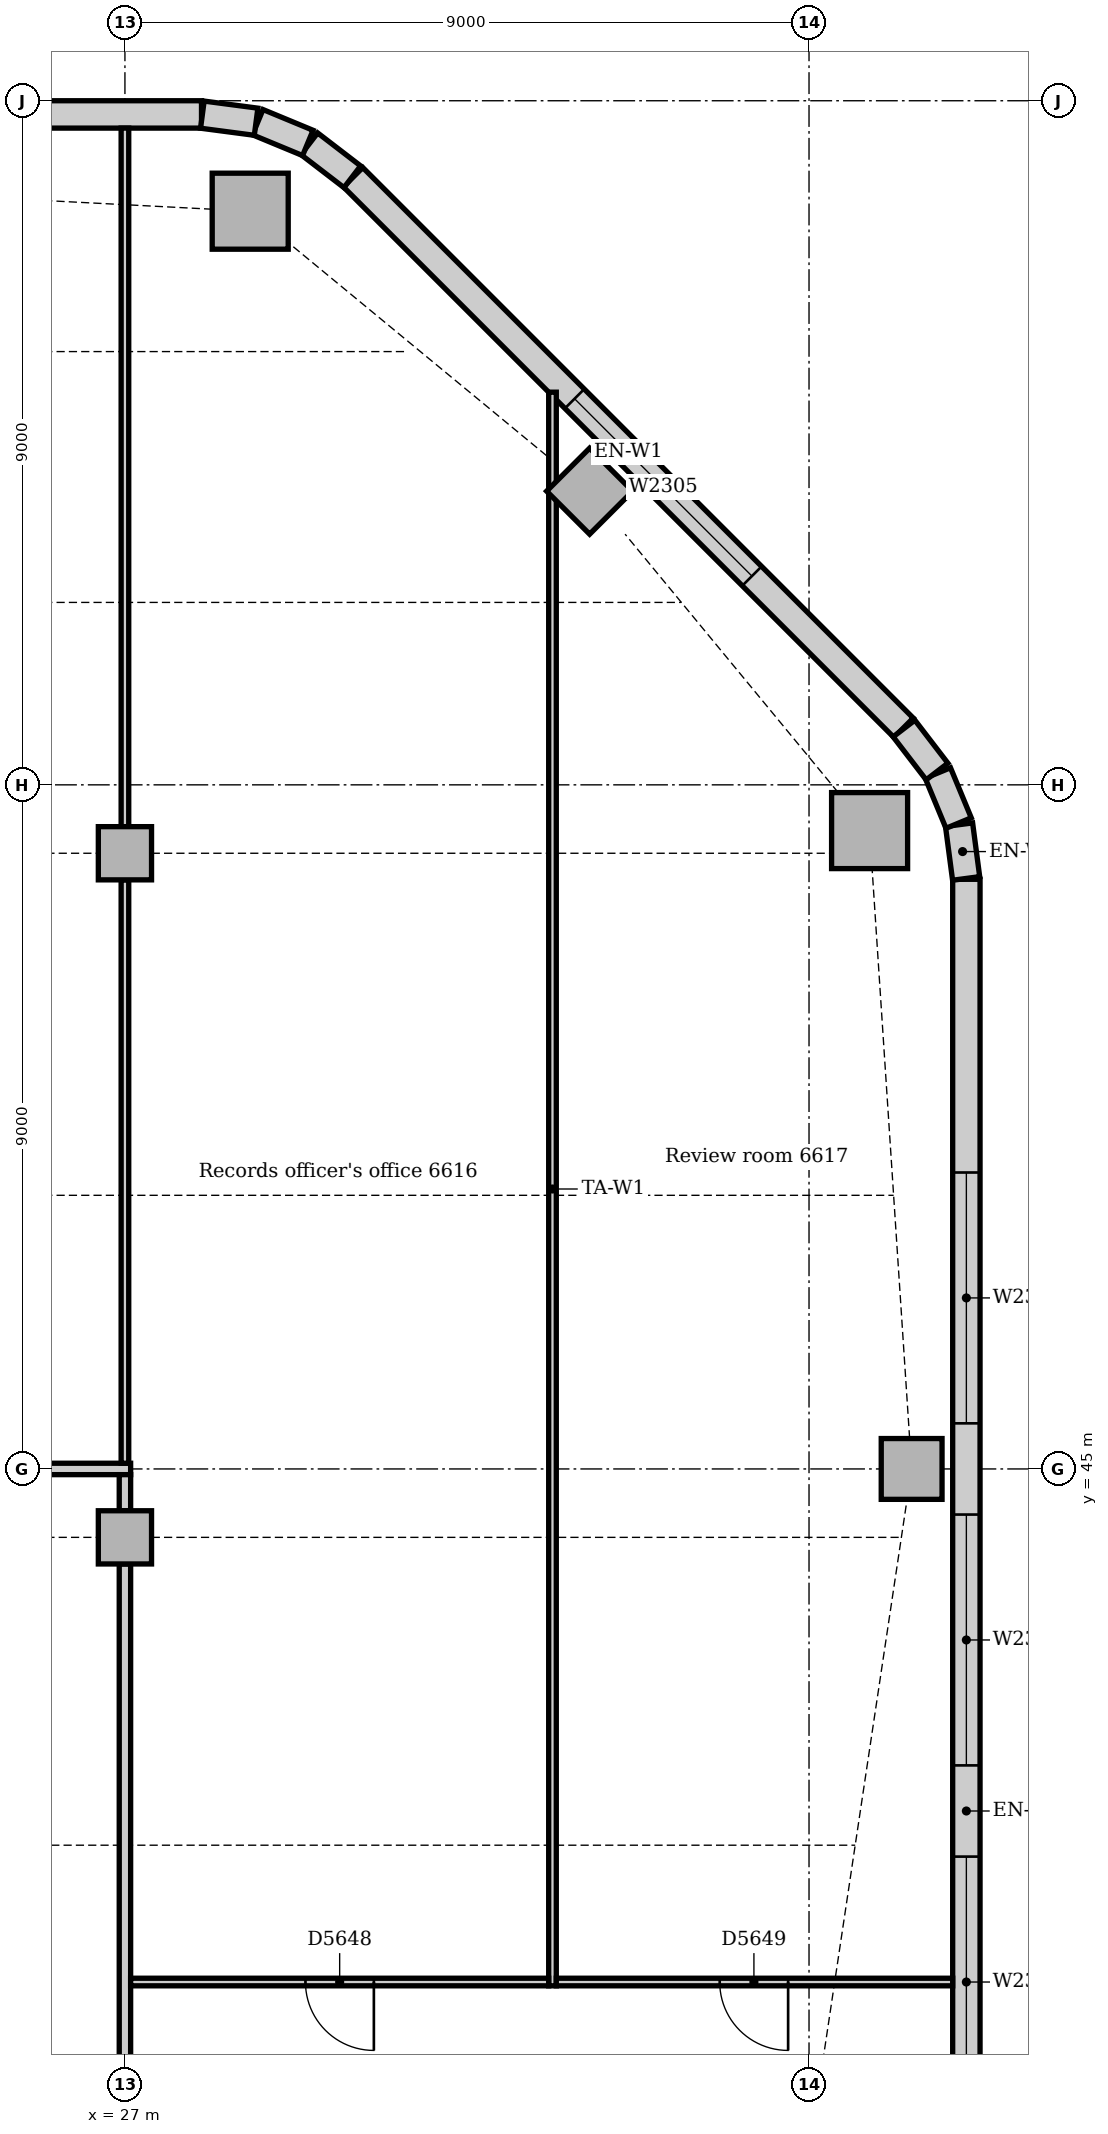
"""IFC4 building model, lengths in metres.
Left out: names, types, materials, properties, quantities, classifications, styles, units other than length and angle.
Written with IfcOpenShell. Run it as: python <this file> out.ifc"""

import sys

from ifc_helpers import new_model, si_unit, direction, frame, frame_2d, origin, origin_2d, place, context, subcontext, project, spatial, rectangle, extrude, element, fill, save


model = new_model("IFC4")
c1 = context("Model", 3, precision=1e-05, world=origin(), true_north=direction((0.0, 1.0)))
c2 = subcontext(c1, "Body", "Model", "MODEL_VIEW")
j1 = project(units=[si_unit("LENGTHUNIT", "METRE"), si_unit("PLANEANGLEUNIT", "RADIAN")], contexts=[c1])
p1 = place(None, origin())
s1 = spatial("IfcSite", under=j1, at=p1, CompositionType="ELEMENT")
p2 = place(p1, origin())
s2 = spatial("IfcBuilding", under=s1, at=p2, CompositionType="ELEMENT")
p3 = place(p2, frame((0.0, 0.0, 275.0)))
s3 = spatial("IfcBuildingStorey", under=s2, at=p3, CompositionType="ELEMENT", Elevation=275.0)
for number, where, z_axis, x_axis in (
    (1, (36.797, 53.398, 0.0), (0.0, 0.0, 1.0), (1.0, 0.0, 0.0)),
    (2, (28.648, 61.547, 0.0), (0.0, 0.0, 1.0), (1.0, 0.0, 0.0)),
):
    element("IfcColumn", number, at=place(p3, frame(where, z_axis=z_axis, x_axis=x_axis)), inside=s3, PredefinedType="COLUMN", context=c2, shape_type="SweptSolid", body=[
        extrude(rectangle(XDim=1.0, YDim=1.0, at=origin_2d()), origin(), (0.0, 0.0, 1.0), 3.85),
    ])
for number, where, z_axis, x_axis in (
    (3, (37.35, 45.0, 0.0), (0.0, 0.0, 1.0), (1.0, 0.0, 0.0)),
    (4, (33.114, 57.864, 0.0), (0.0, 0.0, 1.0), (0.707, 0.707, 0.0)),
):
    element("IfcColumn", number, at=place(p3, frame(where, z_axis=z_axis, x_axis=x_axis)), inside=s3, PredefinedType="COLUMN", context=c2, shape_type="SweptSolid", body=[
        extrude(rectangle(XDim=0.8, YDim=0.8, at=origin_2d()), origin(), (0.0, 0.0, 1.0), 3.85),
    ])
for number, where, z_axis, x_axis in (
    (5, (27.0, 44.1, 0.0), (0.0, 0.0, 1.0), (1.0, 0.0, 0.0)),
    (6, (27.0, 53.1, 0.0), (0.0, 0.0, 1.0), (1.0, 0.0, 0.0)),
):
    element("IfcColumn", number, at=place(p3, frame(where, z_axis=z_axis, x_axis=x_axis)), inside=s3, PredefinedType="COLUMN", context=c2, shape_type="SweptSolid", body=[
        extrude(rectangle(XDim=0.7, YDim=0.7, at=origin_2d()), origin(), (0.0, 0.0, 1.0), 3.85),
    ])
p4 = place(p3, frame((38.07, 28.243, 0.0), z_axis=(0.0, 0.0, 1.0), x_axis=(0.0, 1.0, 0.0)))
e7 = element("IfcWall", 7, at=p4, inside=s3, PredefinedType="STANDARD", context=c2, shape_type="SweptSolid", body=[
    extrude(rectangle(XDim=24.515, YDim=0.36, at=frame_2d((12.257, 0.0))), origin(), (0.0, 0.0, 1.0), 3.85),
])
p5 = place(p4, frame((3.857, 0.0, 0.9)))
e8 = element("IfcOpeningElement", 8, at=p5, cuts=e7, PredefinedType="OPENING", context=c2, shape_type="SweptSolid", body=[
    extrude(rectangle(XDim=3.3, YDim=1.6, at=frame_2d((1.65, 0.8))), frame((0.0, 0.19, 0.0), z_axis=(0.0, -1.0, 0.0), x_axis=(1.0, 0.0, 0.0)), (0.0, 0.0, 1.0), 0.38),
])
p6 = place(p4, frame((8.357, 0.0, 0.9)))
e9 = element("IfcOpeningElement", 9, at=p6, cuts=e7, PredefinedType="OPENING", context=c2, shape_type="SweptSolid", body=[
    extrude(rectangle(XDim=3.3, YDim=1.6, at=frame_2d((1.65, 0.8))), frame((0.0, 0.19, 0.0), z_axis=(0.0, -1.0, 0.0), x_axis=(1.0, 0.0, 0.0)), (0.0, 0.0, 1.0), 0.38),
])
p7 = place(p4, frame((12.857, 0.0, 0.9)))
e10 = element("IfcOpeningElement", 10, at=p7, cuts=e7, PredefinedType="OPENING", context=c2, shape_type="SweptSolid", body=[
    extrude(rectangle(XDim=3.3, YDim=1.6, at=frame_2d((1.65, 0.8))), frame((0.0, 0.19, 0.0), z_axis=(0.0, -1.0, 0.0), x_axis=(1.0, 0.0, 0.0)), (0.0, 0.0, 1.0), 0.38),
])
p8 = place(p4, frame((17.357, 0.0, 0.9)))
e11 = element("IfcOpeningElement", 11, at=p8, cuts=e7, PredefinedType="OPENING", context=c2, shape_type="SweptSolid", body=[
    extrude(rectangle(XDim=3.3, YDim=1.6, at=frame_2d((1.65, 0.8))), frame((0.0, 0.19, 0.0), z_axis=(0.0, -1.0, 0.0), x_axis=(1.0, 0.0, 0.0)), (0.0, 0.0, 1.0), 0.38),
])
p9 = place(p3, frame((37.244, 54.751, 0.0), z_axis=(0.0, 0.0, 1.0), x_axis=(-0.707106781187, 0.707106781187, 0.0)))
e12 = element("IfcWall", 12, at=p9, inside=s3, PredefinedType="STANDARD", context=c2, shape_type="SweptSolid", body=[
    extrude(rectangle(XDim=10.243, YDim=0.36, at=frame_2d((5.121, 0.0))), origin(), (0.0, 0.0, 1.0), 3.85),
])
p10 = place(p9, frame((2.821, 0.0, 0.9)))
e13 = element("IfcOpeningElement", 13, at=p10, cuts=e12, PredefinedType="OPENING", context=c2, shape_type="SweptSolid", body=[
    extrude(rectangle(XDim=3.3, YDim=1.6, at=frame_2d((1.65, 0.8))), frame((0.0, 0.19, 0.0), z_axis=(0.0, -1.0, 0.0), x_axis=(1.0, 0.0, 0.0)), (0.0, 0.0, 1.0), 0.38),
])
p11 = place(p3, frame((28.007, 62.82, 0.0), z_axis=(0.0, 0.0, 1.0), x_axis=(-1.0, 0.0, 0.0)))
e14 = element("IfcWall", 14, at=p11, inside=s3, PredefinedType="STANDARD", context=c2, shape_type="SweptSolid", body=[
    extrude(rectangle(XDim=23.765, YDim=0.36, at=frame_2d((11.882, 0.0))), origin(), (0.0, 0.0, 1.0), 3.85),
])
p12 = place(p11, frame((3.482, 0.0, 0.9)))
e15 = element("IfcOpeningElement", 15, at=p12, cuts=e14, PredefinedType="OPENING", context=c2, shape_type="SweptSolid", body=[
    extrude(rectangle(XDim=3.3, YDim=1.6, at=frame_2d((1.65, 0.8))), frame((0.0, 0.19, 0.0), z_axis=(0.0, -1.0, 0.0), x_axis=(1.0, 0.0, 0.0)), (0.0, 0.0, 1.0), 0.38),
])
p13 = place(p11, frame((7.982, 0.0, 0.9)))
e16 = element("IfcOpeningElement", 16, at=p13, cuts=e14, PredefinedType="OPENING", context=c2, shape_type="SweptSolid", body=[
    extrude(rectangle(XDim=3.3, YDim=1.6, at=frame_2d((1.65, 0.8))), frame((0.0, 0.19, 0.0), z_axis=(0.0, -1.0, 0.0), x_axis=(1.0, 0.0, 0.0)), (0.0, 0.0, 1.0), 0.38),
])
p14 = place(p11, frame((12.482, 0.0, 0.9)))
e17 = element("IfcOpeningElement", 17, at=p14, cuts=e14, PredefinedType="OPENING", context=c2, shape_type="SweptSolid", body=[
    extrude(rectangle(XDim=3.3, YDim=1.6, at=frame_2d((1.65, 0.8))), frame((0.0, 0.19, 0.0), z_axis=(0.0, -1.0, 0.0), x_axis=(1.0, 0.0, 0.0)), (0.0, 0.0, 1.0), 0.38),
])
p15 = place(p11, frame((16.982, 0.0, 0.9)))
e18 = element("IfcOpeningElement", 18, at=p15, cuts=e14, PredefinedType="OPENING", context=c2, shape_type="SweptSolid", body=[
    extrude(rectangle(XDim=3.3, YDim=1.6, at=frame_2d((1.65, 0.8))), frame((0.0, 0.19, 0.0), z_axis=(0.0, -1.0, 0.0), x_axis=(1.0, 0.0, 0.0)), (0.0, 0.0, 1.0), 0.38),
])
for number, where, z_axis, x_axis in (
    (19, (38.067, 52.769, 0.0), (0.0, 0.0, 1.0), (-0.131, 0.991, 0.0)),
    (20, (37.968, 53.497, 0.0), (0.0, 0.0, 1.0), (-0.383, 0.924, 0.0)),
):
    element("IfcWall", number, at=place(p3, frame(where, z_axis=z_axis, x_axis=x_axis)), inside=s3, PredefinedType="STANDARD", context=c2, shape_type="SweptSolid", body=[
        extrude(rectangle(XDim=0.713, YDim=0.36, at=frame_2d((0.356, 0.0))), origin(), (0.0, 0.0, 1.0), 3.85),
    ])
for number, where, z_axis, x_axis in (
    (21, (37.684, 54.175, 0.0), (0.0, 0.0, 1.0), (-0.609, 0.793, 0.0)),
    (22, (29.991, 62.0, 0.0), (0.0, 0.0, 1.0), (-0.793, 0.609, 0.0)),
):
    element("IfcWall", number, at=place(p3, frame(where, z_axis=z_axis, x_axis=x_axis)), inside=s3, PredefinedType="STANDARD", context=c2, shape_type="SweptSolid", body=[
        extrude(rectangle(XDim=0.713, YDim=0.36, at=frame_2d((0.357, 0.0))), origin(), (0.0, 0.0, 1.0), 3.85),
    ])
for number, where, z_axis, x_axis in (
    (23, (29.406, 62.445, 0.0), (0.0, 0.0, 1.0), (-0.924, 0.383, 0.0)),
    (24, (28.726, 62.724, 0.0), (0.0, 0.0, 1.0), (-0.991, 0.131, 0.0)),
):
    element("IfcWall", number, at=place(p3, frame(where, z_axis=z_axis, x_axis=x_axis)), inside=s3, PredefinedType="STANDARD", context=c2, shape_type="SweptSolid", body=[
        extrude(rectangle(XDim=0.713, YDim=0.36, at=frame_2d((0.356, 0.0))), origin(), (0.0, 0.0, 1.0), 3.85),
    ])
p16 = place(p3, frame((0.36, 45.0, 0.0), z_axis=(0.0, 0.0, 1.0), x_axis=(1.0, 0.0, 0.0)))
e25 = element("IfcWall", 25, at=p16, inside=s3, PredefinedType="PARTITIONING", context=c2, shape_type="SweptSolid", body=[
    extrude(rectangle(XDim=26.715, YDim=0.15, at=frame_2d((13.357, 0.0))), origin(), (0.0, 0.0, 1.0), 3.85),
])
p17 = place(p16, frame((3.9, 0.0, 0.0)))
e26 = element("IfcOpeningElement", 26, at=p17, cuts=e25, PredefinedType="OPENING", context=c2, shape_type="SweptSolid", body=[
    extrude(rectangle(XDim=1.0, YDim=2.1, at=frame_2d((0.5, 1.05))), frame((0.0, 0.085, 0.0), z_axis=(0.0, -1.0, 0.0), x_axis=(1.0, 0.0, 0.0)), (0.0, 0.0, 1.0), 0.17),
])
p18 = place(p16, frame((16.39, 0.0, 0.0)))
e27 = element("IfcOpeningElement", 27, at=p18, cuts=e25, PredefinedType="OPENING", context=c2, shape_type="SweptSolid", body=[
    extrude(rectangle(XDim=0.9, YDim=2.1, at=frame_2d((0.45, 1.05))), frame((0.0, 0.085, 0.0), z_axis=(0.0, -1.0, 0.0), x_axis=(1.0, 0.0, 0.0)), (0.0, 0.0, 1.0), 0.17),
])
p19 = place(p3, frame((27.0, 36.35, 0.0), z_axis=(0.0, 0.0, 1.0), x_axis=(0.0, 1.0, 0.0)))
e28 = element("IfcWall", 28, at=p19, inside=s3, PredefinedType="PARTITIONING", context=c2, shape_type="SweptSolid", body=[
    extrude(rectangle(XDim=7.4, YDim=0.15, at=frame_2d((3.7, 0.0))), origin(), (0.0, 0.0, 1.0), 3.4),
])
p20 = place(p3, frame((27.0, 44.45, 0.0), z_axis=(0.0, 0.0, 1.0), x_axis=(0.0, 1.0, 0.0)))
e29 = element("IfcWall", 29, at=p20, inside=s3, PredefinedType="PARTITIONING", context=c2, shape_type="SweptSolid", body=[
    extrude(rectangle(XDim=0.475, YDim=0.15, at=frame_2d((0.237, 0.0))), origin(), (0.0, 0.0, 1.0), 3.85),
])
p21 = place(p3, frame((32.625, 38.2, 0.0), z_axis=(0.0, 0.0, 1.0), x_axis=(0.0, 1.0, 0.0)))
e30 = element("IfcWall", 30, at=p21, inside=s3, PredefinedType="PARTITIONING", context=c2, shape_type="SweptSolid", body=[
    extrude(rectangle(XDim=20.966, YDim=0.1, at=frame_2d((10.483, 0.0))), origin(), (0.0, 0.0, 1.0), 3.85),
])
p22 = place(p3, frame((27.0, 45.075, 0.0), z_axis=(0.0, 0.0, 1.0), x_axis=(0.0, 1.0, 0.0)))
e31 = element("IfcWall", 31, at=p22, inside=s3, PredefinedType="PARTITIONING", context=c2, shape_type="SweptSolid", body=[
    extrude(rectangle(XDim=7.675, YDim=0.1, at=frame_2d((3.837, 0.0))), origin(), (0.0, 0.0, 1.0), 3.4),
])
p23 = place(p3, frame((27.0, 53.45, 0.0), z_axis=(0.0, 0.0, 1.0), x_axis=(0.0, 1.0, 0.0)))
e32 = element("IfcWall", 32, at=p23, inside=s3, PredefinedType="PARTITIONING", context=c2, shape_type="SweptSolid", body=[
    extrude(rectangle(XDim=9.19, YDim=0.1, at=frame_2d((4.595, 0.0))), origin(), (0.0, 0.0, 1.0), 3.4),
])
p24 = place(p3, frame((27.075, 38.25, 0.0), z_axis=(0.0, 0.0, 1.0), x_axis=(1.0, 0.0, 0.0)))
e33 = element("IfcWall", 33, at=p24, inside=s3, PredefinedType="PARTITIONING", context=c2, shape_type="SweptSolid", body=[
    extrude(rectangle(XDim=5.5, YDim=0.1, at=frame_2d((2.75, 0.0))), origin(), (0.0, 0.0, 1.0), 3.85),
])
p25 = place(p24, frame((2.3, 0.0, 0.0)))
e34 = element("IfcOpeningElement", 34, at=p25, cuts=e33, PredefinedType="OPENING", context=c2, shape_type="SweptSolid", body=[
    extrude(rectangle(XDim=0.9, YDim=2.1, at=frame_2d((0.45, 1.05))), frame((0.0, 0.06, 0.0), z_axis=(0.0, -1.0, 0.0), x_axis=(1.0, 0.0, 0.0)), (0.0, 0.0, 1.0), 0.12),
])
p26 = place(p3, frame((32.675, 38.25, 0.0), z_axis=(0.0, 0.0, 1.0), x_axis=(1.0, 0.0, 0.0)))
e35 = element("IfcWall", 35, at=p26, inside=s3, PredefinedType="PARTITIONING", context=c2, shape_type="SweptSolid", body=[
    extrude(rectangle(XDim=5.215, YDim=0.1, at=frame_2d((2.607, 0.0))), origin(), (0.0, 0.0, 1.0), 3.85),
])
p27 = place(p26, frame((2.15, 0.0, 0.0)))
e36 = element("IfcOpeningElement", 36, at=p27, cuts=e35, PredefinedType="OPENING", context=c2, shape_type="SweptSolid", body=[
    extrude(rectangle(XDim=0.9, YDim=2.1, at=frame_2d((0.45, 1.05))), frame((0.0, 0.06, 0.0), z_axis=(0.0, -1.0, 0.0), x_axis=(1.0, 0.0, 0.0)), (0.0, 0.0, 1.0), 0.12),
])
p28 = place(p6, origin())
e37 = element("IfcWindow", 37, at=p28, inside=s3, PartitioningType="SINGLE_PANEL", PredefinedType="WINDOW", context=c2, shape_type="SweptSolid", body=[
    extrude(rectangle(XDim=3.3, YDim=1.6, at=frame_2d((1.65, 0.8))), frame((0.0, 0.13, 0.0), z_axis=(0.0, -1.0, 0.0), x_axis=(1.0, 0.0, 0.0)), (0.0, 0.0, 1.0), 0.06),
])
fill(e9, e37)
p29 = place(p7, origin())
e38 = element("IfcWindow", 38, at=p29, inside=s3, PartitioningType="SINGLE_PANEL", PredefinedType="WINDOW", context=c2, shape_type="SweptSolid", body=[
    extrude(rectangle(XDim=3.3, YDim=1.6, at=frame_2d((1.65, 0.8))), frame((0.0, 0.13, 0.0), z_axis=(0.0, -1.0, 0.0), x_axis=(1.0, 0.0, 0.0)), (0.0, 0.0, 1.0), 0.06),
])
fill(e10, e38)
p30 = place(p8, origin())
e39 = element("IfcWindow", 39, at=p30, inside=s3, PartitioningType="SINGLE_PANEL", PredefinedType="WINDOW", context=c2, shape_type="SweptSolid", body=[
    extrude(rectangle(XDim=3.3, YDim=1.6, at=frame_2d((1.65, 0.8))), frame((0.0, 0.13, 0.0), z_axis=(0.0, -1.0, 0.0), x_axis=(1.0, 0.0, 0.0)), (0.0, 0.0, 1.0), 0.06),
])
fill(e11, e39)
p31 = place(p10, origin())
e40 = element("IfcWindow", 40, at=p31, inside=s3, PartitioningType="SINGLE_PANEL", PredefinedType="WINDOW", context=c2, shape_type="SweptSolid", body=[
    extrude(rectangle(XDim=3.3, YDim=1.6, at=frame_2d((1.65, 0.8))), frame((0.0, 0.13, 0.0), z_axis=(0.0, -1.0, 0.0), x_axis=(1.0, 0.0, 0.0)), (0.0, 0.0, 1.0), 0.06),
])
fill(e13, e40)
p32 = place(p25, frame((0.9, 0.0, 0.0), z_axis=(0.0, 0.0, 1.0), x_axis=(-1.0, 0.0, 0.0)))
e41 = element("IfcDoor", 41, at=p32, inside=s3, OperationType="SINGLE_SWING_LEFT", PredefinedType="DOOR", context=c2, shape_type="SweptSolid", body=[
    extrude(rectangle(XDim=0.9, YDim=2.1, at=frame_2d((0.45, 1.05))), frame((0.0, 0.025, 0.0), z_axis=(0.0, -1.0, 0.0), x_axis=(1.0, 0.0, 0.0)), (0.0, 0.0, 1.0), 0.05),
])
fill(e34, e41)
p33 = place(p27, frame((0.9, 0.0, 0.0), z_axis=(0.0, 0.0, 1.0), x_axis=(-1.0, 0.0, 0.0)))
e42 = element("IfcDoor", 42, at=p33, inside=s3, OperationType="SINGLE_SWING_LEFT", PredefinedType="DOOR", context=c2, shape_type="SweptSolid", body=[
    extrude(rectangle(XDim=0.9, YDim=2.1, at=frame_2d((0.45, 1.05))), frame((0.0, 0.025, 0.0), z_axis=(0.0, -1.0, 0.0), x_axis=(1.0, 0.0, 0.0)), (0.0, 0.0, 1.0), 0.05),
])
fill(e36, e42)
save(model, sys.argv[1])
